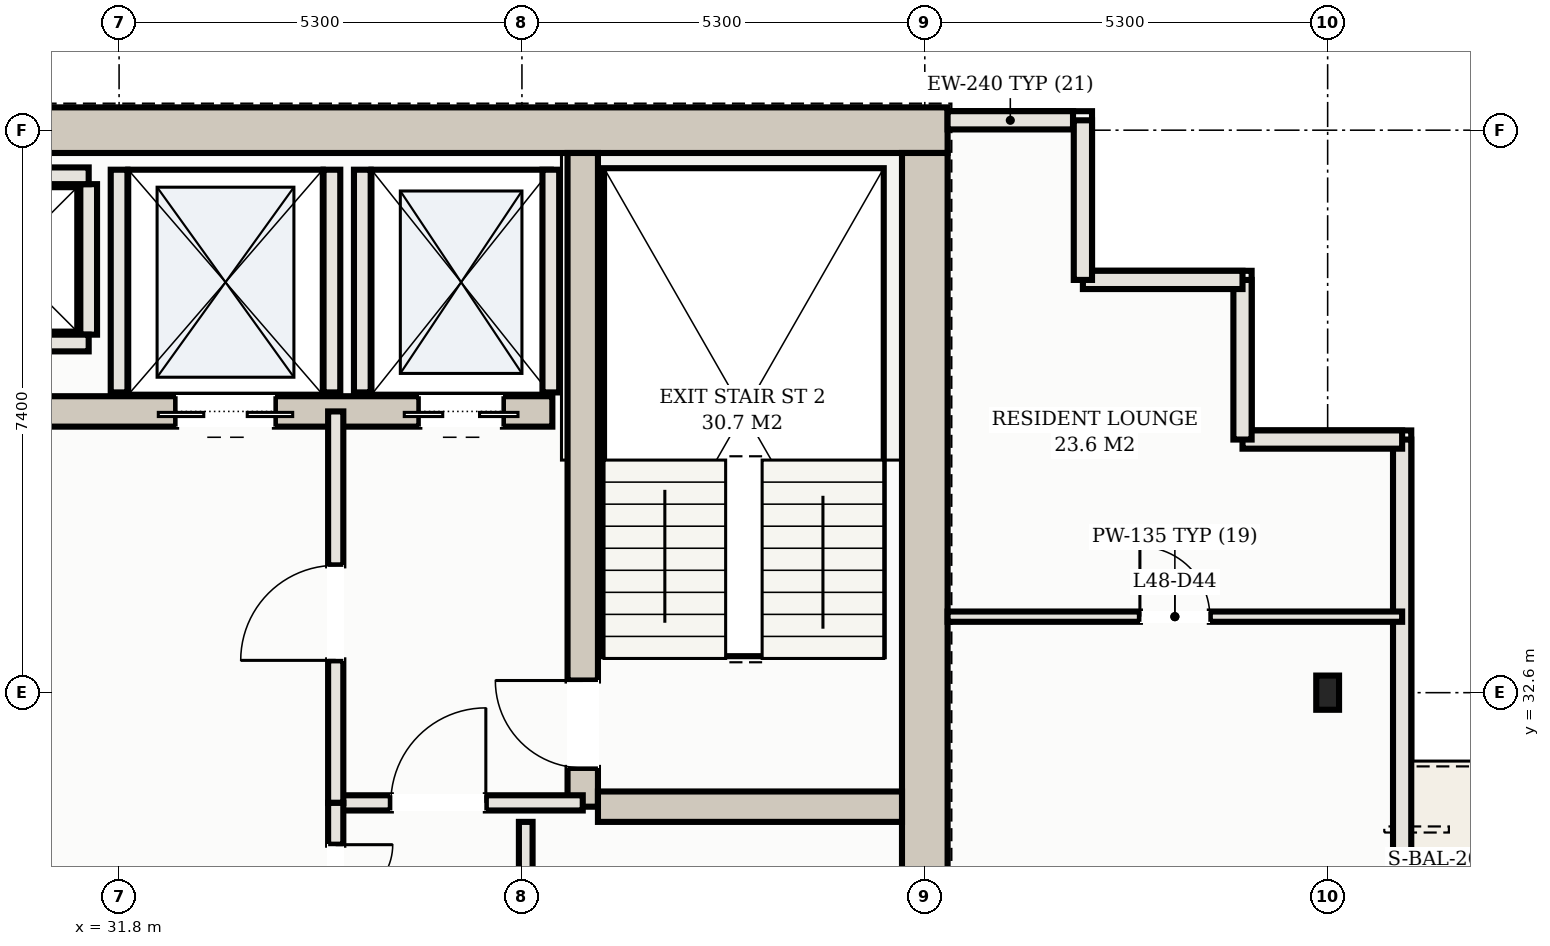
"""IFC4 building model, lengths in metres.
Left out: names, types, materials, properties, quantities, classifications, styles, units other than length and angle.
Written with IfcOpenShell. Run it as: python <this file> out.ifc"""

import sys

from ifc_helpers import new_model, si_unit, direction, frame, frame_2d, origin, origin_2d, place, context, subcontext, project, spatial, rectangle, hollow_rectangle, extrude, element, fill, save


model = new_model("IFC4")
c1 = context("Model", 3, precision=1e-05, world=origin(), true_north=direction((0.0, 1.0)))
c2 = subcontext(c1, "Body", "Model", "MODEL_VIEW")
j1 = project(units=[si_unit("LENGTHUNIT", "METRE"), si_unit("PLANEANGLEUNIT", "RADIAN")], contexts=[c1])
p1 = place(None, origin())
s1 = spatial("IfcSite", under=j1, at=p1, CompositionType="ELEMENT")
p2 = place(p1, origin())
s2 = spatial("IfcBuilding", under=s1, at=p2, CompositionType="ELEMENT")
p3 = place(p2, frame((0.0, 0.0, 175.5)))
s3 = spatial("IfcBuildingStorey", under=s2, at=p3, CompositionType="ELEMENT", Elevation=175.5)
p4 = place(p3, frame((10.3, 40.0, 0.0), z_axis=(0.0, 0.0, 1.0), x_axis=(1.0, 0.0, 0.0)))
e1 = element("IfcWall", 1, at=p4, inside=s3, PredefinedType="SHEAR", context=c2, shape_type="SweptSolid", body=[
    extrude(rectangle(XDim=32.4, YDim=0.6, at=frame_2d((16.2, 0.0))), origin(), (0.0, 0.0, 1.0), 3.1),
])
p5 = place(p3, frame((42.4, 25.5, 0.0), z_axis=(0.0, 0.0, 1.0), x_axis=(0.0, 1.0, 0.0)))
e2 = element("IfcWall", 2, at=p5, inside=s3, PredefinedType="SHEAR", context=c2, shape_type="SweptSolid", body=[
    extrude(rectangle(XDim=14.2, YDim=0.6, at=frame_2d((7.1, 0.0))), origin(), (0.0, 0.0, 1.0), 3.1),
])
p6 = place(p3, frame((37.9, 31.1, 0.0), z_axis=(0.0, 0.0, 1.0), x_axis=(0.0, 1.0, 0.0)))
e3 = element("IfcWall", 3, at=p6, inside=s3, PredefinedType="SHEAR", context=c2, shape_type="SweptSolid", body=[
    extrude(rectangle(XDim=8.6, YDim=0.4, at=frame_2d((4.3, 0.0))), origin(), (0.0, 0.0, 1.0), 3.1),
])
p7 = place(p6, frame((0.51, 0.0, 0.0)))
e4 = element("IfcOpeningElement", 4, at=p7, cuts=e3, PredefinedType="OPENING", context=c2, shape_type="SweptSolid", body=[
    extrude(rectangle(XDim=1.15, YDim=2.2, at=frame_2d((0.575, 1.1))), frame((0.0, 0.21, 0.0), z_axis=(0.0, -1.0, 0.0), x_axis=(1.0, 0.0, 0.0)), (0.0, 0.0, 1.0), 0.42),
])
p8 = place(p3, frame((38.1, 31.1, 0.0), z_axis=(0.0, 0.0, 1.0), x_axis=(1.0, 0.0, 0.0)))
e5 = element("IfcWall", 5, at=p8, inside=s3, PredefinedType="SHEAR", context=c2, shape_type="SweptSolid", body=[
    extrude(rectangle(XDim=4.0, YDim=0.4, at=frame_2d((2.0, 0.0))), origin(), (0.0, 0.0, 1.0), 3.1),
])
p9 = place(p3, frame((15.5, 36.3, 0.0), z_axis=(0.0, 0.0, 1.0), x_axis=(1.0, 0.0, 0.0)))
e6 = element("IfcWall", 6, at=p9, inside=s3, PredefinedType="SHEAR", context=c2, shape_type="SweptSolid", body=[
    extrude(rectangle(XDim=22.0, YDim=0.4, at=frame_2d((11.0, 0.0))), origin(), (0.0, 0.0, 1.0), 3.1),
])
p10 = place(p9, frame((0.65, 0.0, 0.0)))
e7 = element("IfcOpeningElement", 7, at=p10, cuts=e6, PredefinedType="OPENING", context=c2, shape_type="SweptSolid", body=[
    extrude(rectangle(XDim=1.1, YDim=2.15, at=frame_2d((0.55, 1.075))), frame((0.0, 0.21, 0.0), z_axis=(0.0, -1.0, 0.0), x_axis=(1.0, 0.0, 0.0)), (0.0, 0.0, 1.0), 0.42),
])
p11 = place(p9, frame((20.25, 0.0, 0.0)))
e8 = element("IfcOpeningElement", 8, at=p11, cuts=e6, PredefinedType="OPENING", context=c2, shape_type="SweptSolid", body=[
    extrude(rectangle(XDim=1.1, YDim=2.15, at=frame_2d((0.55, 1.075))), frame((0.0, 0.21, 0.0), z_axis=(0.0, -1.0, 0.0), x_axis=(1.0, 0.0, 0.0)), (0.0, 0.0, 1.0), 0.42),
])
p12 = place(p9, frame((17.05, 0.0, 0.0)))
e9 = element("IfcOpeningElement", 9, at=p12, cuts=e6, PredefinedType="OPENING", context=c2, shape_type="SweptSolid", body=[
    extrude(rectangle(XDim=1.3, YDim=2.2, at=frame_2d((0.65, 1.1))), frame((0.0, 0.21, 0.0), z_axis=(0.0, -1.0, 0.0), x_axis=(1.0, 0.0, 0.0)), (0.0, 0.0, 1.0), 0.42),
])
p13 = place(p3, frame((47.7, 32.6, 0.0), z_axis=(0.0, 0.0, 1.0), x_axis=(1.0, 0.0, 0.0)))
e10 = element("IfcColumn", 10, at=p13, inside=s3, PredefinedType="COLUMN", context=c2, shape_type="SweptSolid", body=[
    extrude(hollow_rectangle(XDim=0.3, YDim=0.45, WallThickness=0.016, at=origin_2d()), origin(), (0.0, 0.0, 1.0), 3.3),
])
for number, where, z_axis, x_axis in (
    (11, (35.0, 36.55, 0.0), (0.0, 0.0, 1.0), (0.0, 1.0, 0.0)),
    (12, (37.48, 36.55, 0.0), (0.0, 0.0, 1.0), (0.0, 1.0, 0.0)),
    (13, (31.8, 36.55, 0.0), (0.0, 0.0, 1.0), (0.0, 1.0, 0.0)),
    (14, (34.6, 36.55, 0.0), (0.0, 0.0, 1.0), (0.0, 1.0, 0.0)),
):
    element("IfcWall", number, at=place(p3, frame(where, z_axis=z_axis, x_axis=x_axis)), inside=s3, PredefinedType="SOLIDWALL", context=c2, shape_type="SweptSolid", body=[
        extrude(rectangle(XDim=2.93, YDim=0.22, at=frame_2d((1.465, 0.0))), origin(), (0.0, 0.0, 1.0), 3.1),
    ])
p14 = place(p3, frame((31.4, 37.31, 0.0), z_axis=(0.0, 0.0, 1.0), x_axis=(0.0, 1.0, 0.0)))
e15 = element("IfcWall", 15, at=p14, inside=s3, PredefinedType="SOLIDWALL", context=c2, shape_type="SweptSolid", body=[
    extrude(rectangle(XDim=1.98, YDim=0.22, at=frame_2d((0.99, 0.0))), origin(), (0.0, 0.0, 1.0), 3.1),
])
for number, where, z_axis, x_axis in (
    (16, (29.2, 39.4, 0.0), (0.0, 0.0, 1.0), (1.0, 0.0, 0.0)),
    (17, (29.2, 37.2, 0.0), (0.0, 0.0, 1.0), (1.0, 0.0, 0.0)),
):
    element("IfcWall", number, at=place(p3, frame(where, z_axis=z_axis, x_axis=x_axis)), inside=s3, PredefinedType="SOLIDWALL", context=c2, shape_type="SweptSolid", body=[
        extrude(rectangle(XDim=2.2, YDim=0.22, at=frame_2d((1.1, 0.0))), origin(), (0.0, 0.0, 1.0), 3.1),
    ])
p15 = place(p3, frame((48.68, 8.52, 0.0), z_axis=(0.0, 0.0, 1.0), x_axis=(0.0, 1.0, 0.0)))
e18 = element("IfcWall", 18, at=p15, inside=s3, PredefinedType="SOLIDWALL", context=c2, shape_type="SweptSolid", body=[
    extrude(rectangle(XDim=27.41, YDim=0.24, at=frame_2d((13.705, 0.0))), origin(), (0.0, 0.0, 1.0), 3.1),
])
p16 = place(p15, frame((19.48, 0.0, 0.0)))
e19 = element("IfcOpeningElement", 19, at=p16, cuts=e18, PredefinedType="OPENING", context=c2, shape_type="SweptSolid", body=[
    extrude(rectangle(XDim=1.8, YDim=2.2, at=frame_2d((0.9, 1.1))), frame((0.0, 0.13, 0.0), z_axis=(0.0, -1.0, 0.0), x_axis=(1.0, 0.0, 0.0)), (0.0, 0.0, 1.0), 0.26),
])
p17 = place(p3, frame((48.68, 35.93, 0.0), z_axis=(0.0, 0.0, 1.0), x_axis=(-1.0, 0.0, 0.0)))
e20 = element("IfcWall", 20, at=p17, inside=s3, PredefinedType="SOLIDWALL", context=c2, shape_type="SweptSolid", body=[
    extrude(rectangle(XDim=2.1, YDim=0.24, at=frame_2d((1.05, 0.0))), origin(), (0.0, 0.0, 1.0), 3.1),
])
for number, where, z_axis, x_axis in (
    (21, (46.58, 35.93, 0.0), (0.0, 0.0, 1.0), (0.0, 1.0, 0.0)),
    (22, (46.58, 38.03, 0.0), (0.0, 0.0, 1.0), (-1.0, 0.0, 0.0)),
):
    element("IfcWall", number, at=place(p3, frame(where, z_axis=z_axis, x_axis=x_axis)), inside=s3, PredefinedType="SOLIDWALL", context=c2, shape_type="SweptSolid", body=[
        extrude(rectangle(XDim=2.1, YDim=0.24, at=frame_2d((1.05, 0.0))), origin(), (0.0, 0.0, 1.0), 3.1),
    ])
p18 = place(p3, frame((44.48, 38.03, 0.0), z_axis=(0.0, 0.0, 1.0), x_axis=(0.0, 1.0, 0.0)))
e23 = element("IfcWall", 23, at=p18, inside=s3, PredefinedType="SOLIDWALL", context=c2, shape_type="SweptSolid", body=[
    extrude(rectangle(XDim=2.1, YDim=0.24, at=frame_2d((1.05, 0.0))), origin(), (0.0, 0.0, 1.0), 3.1),
])
p19 = place(p3, frame((44.35, 40.13, 0.0), z_axis=(0.0, 0.0, 1.0), x_axis=(-1.0, 0.0, 0.0)))
e24 = element("IfcWall", 24, at=p19, inside=s3, PredefinedType="SOLIDWALL", context=c2, shape_type="SweptSolid", body=[
    extrude(rectangle(XDim=1.65, YDim=0.24, at=frame_2d((0.825, 0.0))), origin(), (0.0, 0.0, 1.0), 3.1),
])
p20 = place(p3, frame((34.65, 31.15, 0.0), z_axis=(0.0, 0.0, 1.0), x_axis=(1.0, 0.0, 0.0)))
e25 = element("IfcWall", 25, at=p20, inside=s3, PredefinedType="PARTITIONING", context=c2, shape_type="SweptSolid", body=[
    extrude(rectangle(XDim=3.25, YDim=0.2, at=frame_2d((1.625, 0.0))), origin(), (0.0, 0.0, 1.0), 2.38),
])
p21 = place(p20, frame((0.725, 0.0, 0.0)))
e26 = element("IfcOpeningElement", 26, at=p21, cuts=e25, PredefinedType="OPENING", context=c2, shape_type="SweptSolid", body=[
    extrude(rectangle(XDim=1.25, YDim=2.2, at=frame_2d((0.625, 1.1))), frame((0.0, 0.11, 0.0), z_axis=(0.0, -1.0, 0.0), x_axis=(1.0, 0.0, 0.0)), (0.0, 0.0, 1.0), 0.22),
])
p22 = place(p3, frame((34.65, 31.15, 0.0), z_axis=(0.0, 0.0, 1.0), x_axis=(0.0, 1.0, 0.0)))
e27 = element("IfcWall", 27, at=p22, inside=s3, PredefinedType="PARTITIONING", context=c2, shape_type="SweptSolid", body=[
    extrude(rectangle(XDim=5.15, YDim=0.2, at=frame_2d((2.575, 0.0))), origin(), (0.0, 0.0, 1.0), 2.38),
])
p23 = place(p22, frame((1.875, 0.0, 0.0)))
e28 = element("IfcOpeningElement", 28, at=p23, cuts=e27, PredefinedType="OPENING", context=c2, shape_type="SweptSolid", body=[
    extrude(rectangle(XDim=1.25, YDim=2.2, at=frame_2d((0.625, 1.1))), frame((0.0, 0.11, 0.0), z_axis=(0.0, -1.0, 0.0), x_axis=(1.0, 0.0, 0.0)), (0.0, 0.0, 1.0), 0.22),
])
p24 = place(p3, frame((37.15, 25.5, 0.0), z_axis=(0.0, 0.0, 1.0), x_axis=(0.0, 1.0, 0.0)))
e29 = element("IfcWall", 29, at=p24, inside=s3, PredefinedType="PARTITIONING", context=c2, shape_type="SweptSolid", body=[
    extrude(rectangle(XDim=5.4, YDim=0.18, at=frame_2d((2.7, 0.0))), origin(), (0.0, 0.0, 1.0), 2.38),
])
p25 = place(p24, frame((2.24, 0.0, 0.0)))
e30 = element("IfcOpeningElement", 30, at=p25, cuts=e29, PredefinedType="OPENING", context=c2, shape_type="SweptSolid", body=[
    extrude(rectangle(XDim=0.92, YDim=2.15, at=frame_2d((0.46, 1.075))), frame((0.0, 0.1, 0.0), z_axis=(0.0, -1.0, 0.0), x_axis=(1.0, 0.0, 0.0)), (0.0, 0.0, 1.0), 0.2),
])
p26 = place(p3, frame((34.65, 28.55, 0.0), z_axis=(0.0, 0.0, 1.0), x_axis=(0.0, 1.0, 0.0)))
e31 = element("IfcWall", 31, at=p26, inside=s3, PredefinedType="PARTITIONING", context=c2, shape_type="SweptSolid", body=[
    extrude(rectangle(XDim=2.6, YDim=0.2, at=frame_2d((1.3, 0.0))), origin(), (0.0, 0.0, 1.0), 2.38),
])
p27 = place(p26, frame((0.55, 0.0, 0.0)))
e32 = element("IfcOpeningElement", 32, at=p27, cuts=e31, PredefinedType="OPENING", context=c2, shape_type="SweptSolid", body=[
    extrude(rectangle(XDim=1.5, YDim=2.25, at=frame_2d((0.75, 1.125))), frame((0.0, 0.11, 0.0), z_axis=(0.0, -1.0, 0.0), x_axis=(1.0, 0.0, 0.0)), (0.0, 0.0, 1.0), 0.22),
])
p28 = place(p3, frame((42.7, 33.6, 0.0), z_axis=(0.0, 0.0, 1.0), x_axis=(1.0, 0.0, 0.0)))
e33 = element("IfcWall", 33, at=p28, inside=s3, PredefinedType="PARTITIONING", context=c2, shape_type="SweptSolid", body=[
    extrude(rectangle(XDim=5.98, YDim=0.135, at=frame_2d((2.99, 0.0))), origin(), (0.0, 0.0, 1.0), 2.38),
])
p29 = place(p28, frame((2.53, 0.0, 0.0)))
e34 = element("IfcOpeningElement", 34, at=p29, cuts=e33, PredefinedType="OPENING", context=c2, shape_type="SweptSolid", body=[
    extrude(rectangle(XDim=0.92, YDim=2.15, at=frame_2d((0.46, 1.075))), frame((0.0, 0.078, 0.0), z_axis=(0.0, -1.0, 0.0), x_axis=(1.0, 0.0, 0.0)), (0.0, 0.0, 1.0), 0.155),
])
p30 = place(p11, frame((1.1, 0.0, 0.0), z_axis=(0.0, 0.0, 1.0), x_axis=(-1.0, 0.0, 0.0)))
e35 = element("IfcDoor", 35, at=p30, inside=s3, OperationType="DOUBLE_DOOR_SLIDING", PredefinedType="DOOR", context=c2, shape_type="SweptSolid", body=[
    extrude(rectangle(XDim=1.1, YDim=2.15, at=frame_2d((0.55, 1.075))), frame((0.0, 0.025, 0.0), z_axis=(0.0, -1.0, 0.0), x_axis=(1.0, 0.0, 0.0)), (0.0, 0.0, 1.0), 0.05),
])
fill(e8, e35)
p31 = place(p12, frame((1.3, 0.0, 0.0), z_axis=(0.0, 0.0, 1.0), x_axis=(-1.0, 0.0, 0.0)))
e36 = element("IfcDoor", 36, at=p31, inside=s3, OperationType="DOUBLE_DOOR_SLIDING", PredefinedType="DOOR", context=c2, shape_type="SweptSolid", body=[
    extrude(rectangle(XDim=1.3, YDim=2.2, at=frame_2d((0.65, 1.1))), frame((0.0, 0.025, 0.0), z_axis=(0.0, -1.0, 0.0), x_axis=(1.0, 0.0, 0.0)), (0.0, 0.0, 1.0), 0.05),
])
fill(e9, e36)
p32 = place(p21, origin())
e37 = element("IfcDoor", 37, at=p32, inside=s3, OperationType="SINGLE_SWING_RIGHT", PredefinedType="DOOR", context=c2, shape_type="SweptSolid", body=[
    extrude(rectangle(XDim=1.25, YDim=2.2, at=frame_2d((0.625, 1.1))), frame((0.0, 0.025, 0.0), z_axis=(0.0, -1.0, 0.0), x_axis=(1.0, 0.0, 0.0)), (0.0, 0.0, 1.0), 0.05),
])
fill(e26, e37)
p33 = place(p23, origin())
e38 = element("IfcDoor", 38, at=p33, inside=s3, OperationType="SINGLE_SWING_LEFT", PredefinedType="DOOR", context=c2, shape_type="SweptSolid", body=[
    extrude(rectangle(XDim=1.25, YDim=2.2, at=frame_2d((0.625, 1.1))), frame((0.0, 0.025, 0.0), z_axis=(0.0, -1.0, 0.0), x_axis=(1.0, 0.0, 0.0)), (0.0, 0.0, 1.0), 0.05),
])
fill(e28, e38)
p34 = place(p7, origin())
e39 = element("IfcDoor", 39, at=p34, inside=s3, OperationType="SINGLE_SWING_RIGHT", PredefinedType="DOOR", context=c2, shape_type="SweptSolid", body=[
    extrude(rectangle(XDim=1.15, YDim=2.2, at=frame_2d((0.575, 1.1))), frame((0.0, 0.025, 0.0), z_axis=(0.0, -1.0, 0.0), x_axis=(1.0, 0.0, 0.0)), (0.0, 0.0, 1.0), 0.05),
])
fill(e4, e39)
p35 = place(p27, frame((1.5, 0.0, 0.0), z_axis=(0.0, 0.0, 1.0), x_axis=(-1.0, 0.0, 0.0)))
e40 = element("IfcDoor", 40, at=p35, inside=s3, OperationType="DOUBLE_DOOR_SINGLE_SWING", PredefinedType="DOOR", context=c2, shape_type="SweptSolid", body=[
    extrude(rectangle(XDim=1.5, YDim=2.25, at=frame_2d((0.75, 1.125))), frame((0.0, 0.025, 0.0), z_axis=(0.0, -1.0, 0.0), x_axis=(1.0, 0.0, 0.0)), (0.0, 0.0, 1.0), 0.05),
])
fill(e32, e40)
p36 = place(p29, origin())
e41 = element("IfcDoor", 41, at=p36, inside=s3, OperationType="SINGLE_SWING_LEFT", PredefinedType="DOOR", context=c2, shape_type="SweptSolid", body=[
    extrude(rectangle(XDim=0.92, YDim=2.15, at=frame_2d((0.46, 1.075))), frame((0.0, 0.025, 0.0), z_axis=(0.0, -1.0, 0.0), x_axis=(1.0, 0.0, 0.0)), (0.0, 0.0, 1.0), 0.05),
])
fill(e34, e41)
save(model, sys.argv[1])
